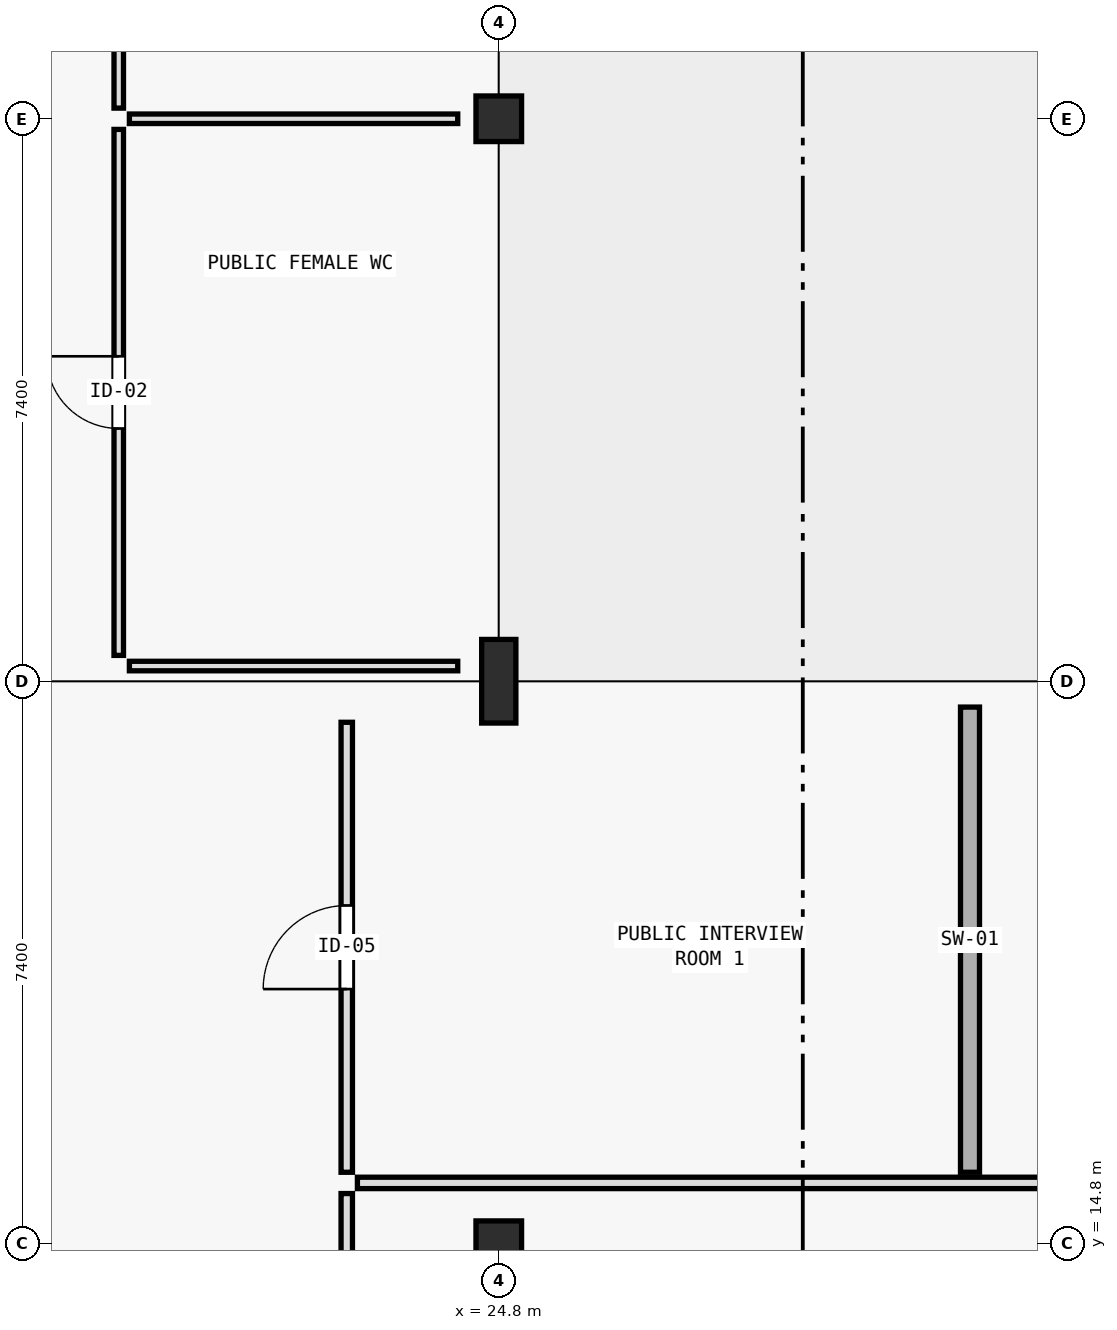
"""IFC4 building model, lengths in metres.
Left out: names, types, materials, properties, quantities, classifications, styles, units other than length and angle.
Written with IfcOpenShell. Run it as: python <this file> out.ifc"""

import sys

from ifc_helpers import new_model, si_unit, direction, frame, frame_2d, origin, origin_2d, place, context, subcontext, project, spatial, rectangle, extrude, element, fill, save


model = new_model("IFC4")
c1 = context("Model", 3, precision=1e-05, world=origin(), true_north=direction((0.0, 1.0)))
c2 = subcontext(c1, "Body", "Model", "MODEL_VIEW")
j1 = project(units=[si_unit("LENGTHUNIT", "METRE"), si_unit("PLANEANGLEUNIT", "RADIAN")], contexts=[c1])
p1 = place(None, origin())
s1 = spatial("IfcSite", under=j1, at=p1, CompositionType="ELEMENT")
p2 = place(p1, origin())
s2 = spatial("IfcBuilding", under=s1, at=p2, CompositionType="ELEMENT")
p3 = place(p2, origin())
s3 = spatial("IfcBuildingStorey", under=s2, at=p3, CompositionType="ELEMENT", Elevation=0.0)
p4 = place(p3, frame((24.8, 14.8, 0.0), z_axis=(0.0, 0.0, 1.0), x_axis=(1.0, 0.0, 0.0)))
e1 = element("IfcColumn", 1, at=p4, inside=s3, PredefinedType="COLUMN", context=c2, shape_type="SweptSolid", body=[
    extrude(rectangle(XDim=0.6, YDim=0.6, at=origin_2d()), origin(), (0.0, 0.0, 1.0), 5.4),
])
p5 = place(p3, frame((24.8, 22.2, 0.0), z_axis=(0.0, 0.0, 1.0), x_axis=(1.0, 0.0, 0.0)))
e2 = element("IfcColumn", 2, at=p5, inside=s3, PredefinedType="PILASTER", context=c2, shape_type="SweptSolid", body=[
    extrude(rectangle(XDim=0.45, YDim=1.1, at=origin_2d()), origin(), (0.0, 0.0, 1.0), 5.4),
])
p6 = place(p3, frame((24.8, 29.6, 0.0), z_axis=(0.0, 0.0, 1.0), x_axis=(1.0, 0.0, 0.0)))
e3 = element("IfcColumn", 3, at=p6, inside=s3, PredefinedType="COLUMN", context=c2, shape_type="SweptSolid", body=[
    extrude(rectangle(XDim=0.6, YDim=0.6, at=origin_2d()), origin(), (0.0, 0.0, 1.0), 5.4),
])
p7 = place(p3, frame((22.94, 15.6, 0.0), z_axis=(0.0, 0.0, 1.0), x_axis=(1.0, 0.0, 0.0)))
e4 = element("IfcWall", 4, at=p7, inside=s3, PredefinedType="PARTITIONING", context=c2, shape_type="SweptSolid", body=[
    extrude(rectangle(XDim=28.92, YDim=0.15, at=frame_2d((14.46, 0.0))), origin(), (0.0, 0.0, 1.0), 4.27),
])
p8 = place(p3, frame((22.8, 0.54, 0.0), z_axis=(0.0, 0.0, 1.0), x_axis=(0.0, 1.0, 0.0)))
e5 = element("IfcWall", 5, at=p8, inside=s3, PredefinedType="PARTITIONING", context=c2, shape_type="SweptSolid", body=[
    extrude(rectangle(XDim=14.92, YDim=0.15, at=frame_2d((7.46, 0.0))), origin(), (0.0, 0.0, 1.0), 4.27),
])
p9 = place(p8, frame((4.172, 0.0, 0.0)))
e6 = element("IfcOpeningElement", 6, at=p9, cuts=e5, PredefinedType="OPENING", context=c2, shape_type="SweptSolid", body=[
    extrude(rectangle(XDim=2.1, YDim=2.4, at=frame_2d((1.05, 1.2))), frame((0.0, 0.085, 0.0), z_axis=(0.0, -1.0, 0.0), x_axis=(1.0, 0.0, 0.0)), (0.0, 0.0, 1.0), 0.17),
])
p10 = place(p3, frame((31.0, 15.74, 0.0), z_axis=(0.0, 0.0, 1.0), x_axis=(0.0, 1.0, 0.0)))
e7 = element("IfcWall", 7, at=p10, inside=s3, PredefinedType="SOLIDWALL", context=c2, shape_type="SweptSolid", body=[
    extrude(rectangle(XDim=6.12, YDim=0.25, at=frame_2d((3.06, 0.0))), origin(), (0.0, 0.0, 1.0), 5.14),
])
for number, where, z_axis, x_axis in (
    (8, (19.94, 22.4, 0.0), (0.0, 0.0, 1.0), (1.0, 0.0, 0.0)),
    (9, (19.94, 29.6, 0.0), (0.0, 0.0, 1.0), (1.0, 0.0, 0.0)),
):
    element("IfcWall", number, at=place(p3, frame(where, z_axis=z_axis, x_axis=x_axis)), inside=s3, PredefinedType="PARTITIONING", context=c2, shape_type="SweptSolid", body=[
        extrude(rectangle(XDim=4.32, YDim=0.125, at=frame_2d((2.16, 0.0))), origin(), (0.0, 0.0, 1.0), 4.27),
    ])
p11 = place(p3, frame((19.8, 22.54, 0.0), z_axis=(0.0, 0.0, 1.0), x_axis=(0.0, 1.0, 0.0)))
e10 = element("IfcWall", 10, at=p11, inside=s3, PredefinedType="PARTITIONING", context=c2, shape_type="SweptSolid", body=[
    extrude(rectangle(XDim=6.92, YDim=0.125, at=frame_2d((3.46, 0.0))), origin(), (0.0, 0.0, 1.0), 4.27),
])
p12 = place(p11, frame((2.985, 0.0, 0.0)))
e11 = element("IfcOpeningElement", 11, at=p12, cuts=e10, PredefinedType="OPENING", context=c2, shape_type="SweptSolid", body=[
    extrude(rectangle(XDim=0.95, YDim=2.1, at=frame_2d((0.475, 1.05))), frame((0.0, 0.073, 0.0), z_axis=(0.0, -1.0, 0.0), x_axis=(1.0, 0.0, 0.0)), (0.0, 0.0, 1.0), 0.145),
])
p13 = place(p3, frame((22.8, 15.74, 0.0), z_axis=(0.0, 0.0, 1.0), x_axis=(0.0, 1.0, 0.0)))
e12 = element("IfcWall", 12, at=p13, inside=s3, PredefinedType="PARTITIONING", context=c2, shape_type="SweptSolid", body=[
    extrude(rectangle(XDim=5.92, YDim=0.15, at=frame_2d((2.96, 0.0))), origin(), (0.0, 0.0, 1.0), 5.14),
])
p14 = place(p13, frame((2.41, 0.0, 0.0)))
e13 = element("IfcOpeningElement", 13, at=p14, cuts=e12, PredefinedType="OPENING", context=c2, shape_type="SweptSolid", body=[
    extrude(rectangle(XDim=1.1, YDim=2.2, at=frame_2d((0.55, 1.1))), frame((0.0, 0.085, 0.0), z_axis=(0.0, -1.0, 0.0), x_axis=(1.0, 0.0, 0.0)), (0.0, 0.0, 1.0), 0.17),
])
p15 = place(p3, frame((19.8, 29.74, 0.0), z_axis=(0.0, 0.0, 1.0), x_axis=(0.0, 1.0, 0.0)))
e14 = element("IfcWall", 14, at=p15, inside=s3, PredefinedType="PARTITIONING", context=c2, shape_type="SweptSolid", body=[
    extrude(rectangle(XDim=7.12, YDim=0.125, at=frame_2d((3.56, 0.0))), origin(), (0.0, 0.0, 1.0), 4.27),
])
p16 = place(p15, frame((3.06, 0.0, 0.0)))
e15 = element("IfcOpeningElement", 15, at=p16, cuts=e14, PredefinedType="OPENING", context=c2, shape_type="SweptSolid", body=[
    extrude(rectangle(XDim=1.0, YDim=2.2, at=frame_2d((0.5, 1.1))), frame((0.0, 0.073, 0.0), z_axis=(0.0, -1.0, 0.0), x_axis=(1.0, 0.0, 0.0)), (0.0, 0.0, 1.0), 0.145),
])
p17 = place(p12, origin())
e16 = element("IfcDoor", 16, at=p17, inside=s3, OperationType="SINGLE_SWING_RIGHT", PredefinedType="DOOR", context=c2, shape_type="SweptSolid", body=[
    extrude(rectangle(XDim=0.95, YDim=2.1, at=frame_2d((0.475, 1.05))), frame((0.0, 0.025, 0.0), z_axis=(0.0, -1.0, 0.0), x_axis=(1.0, 0.0, 0.0)), (0.0, 0.0, 1.0), 0.05),
])
fill(e11, e16)
p18 = place(p14, origin())
e17 = element("IfcDoor", 17, at=p18, inside=s3, OperationType="SINGLE_SWING_LEFT", PredefinedType="DOOR", context=c2, shape_type="SweptSolid", body=[
    extrude(rectangle(XDim=1.1, YDim=2.2, at=frame_2d((0.55, 1.1))), frame((0.0, 0.025, 0.0), z_axis=(0.0, -1.0, 0.0), x_axis=(1.0, 0.0, 0.0)), (0.0, 0.0, 1.0), 0.05),
])
fill(e13, e17)
save(model, sys.argv[1])
